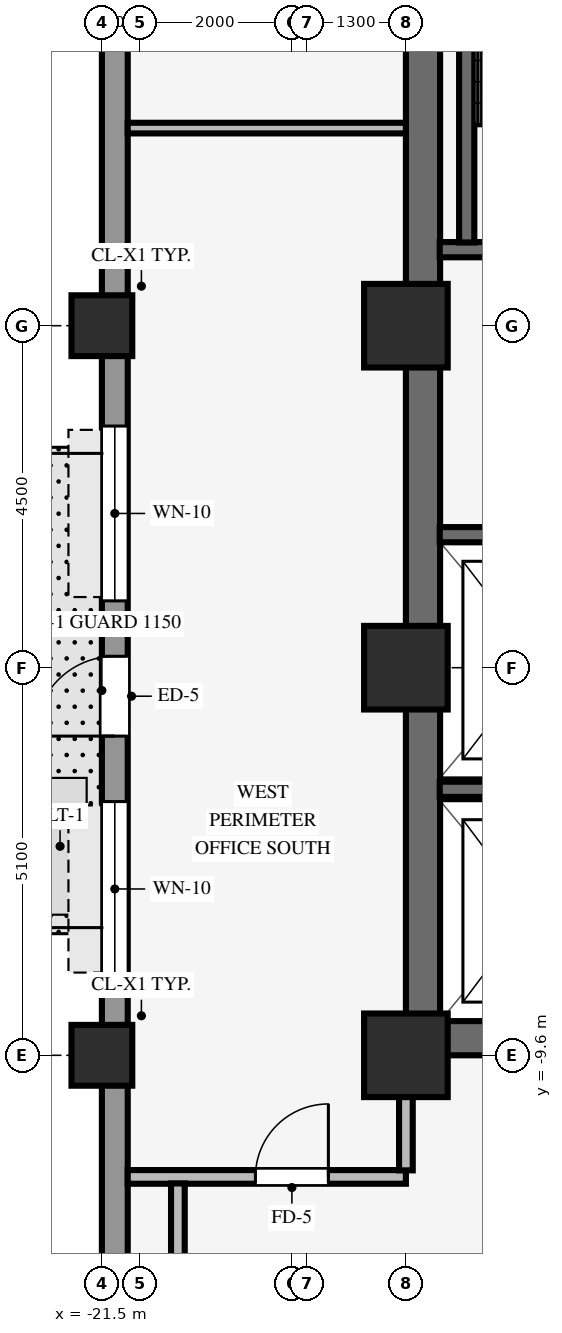
"""IFC4 building model, lengths in metres.
Left out: names, types, materials, properties, quantities, classifications, styles, units other than length and angle.
Written with IfcOpenShell. Run it as: python <this file> out.ifc"""

import sys

from ifc_helpers import new_model, si_unit, direction, frame, frame_2d, origin, origin_2d, place, context, subcontext, project, spatial, rectangle, hollow_rectangle, extrude, source, transform, mapped, element, fill, save


model = new_model("IFC4")
c1 = context("Model", 3, precision=1e-05, world=origin(), true_north=direction((0.0, 1.0)))
c2 = subcontext(c1, "Body", "Model", "MODEL_VIEW")
j1 = project(units=[si_unit("LENGTHUNIT", "METRE"), si_unit("PLANEANGLEUNIT", "RADIAN")], contexts=[c1])
p1 = place(None, origin())
s1 = spatial("IfcSite", under=j1, at=p1, CompositionType="ELEMENT")
p2 = place(p1, origin())
s2 = spatial("IfcBuilding", under=s1, at=p2, CompositionType="ELEMENT")
p3 = place(p2, frame((0.0, 0.0, 67.75)))
s3 = spatial("IfcBuildingStorey", under=s2, at=p3, CompositionType="ELEMENT", Elevation=67.75)
p4 = place(p3, frame((-17.5, -9.375, 0.0), z_axis=(0.0, 0.0, 1.0), x_axis=(1.0, 0.0, 0.0)))
e1 = element("IfcWall", 1, at=p4, inside=s3, PredefinedType="SHEAR", context=c2, shape_type="SweptSolid", body=[
    extrude(rectangle(XDim=8.5, YDim=0.45, at=frame_2d((4.25, 0.0))), origin(), (0.0, 0.0, 1.0), 3.37),
])
p5 = place(p3, frame((-17.275, -9.155, 0.0), z_axis=(0.0, 0.0, 1.0), x_axis=(0.0, 1.0, 0.0)))
e2 = element("IfcWall", 2, at=p5, inside=s3, PredefinedType="SHEAR", context=c2, shape_type="SweptSolid", body=[
    extrude(rectangle(XDim=18.31, YDim=0.45, at=frame_2d((9.155, 0.0))), origin(), (0.0, 0.0, 1.0), 3.37),
])
for number, where, z_axis, x_axis in (
    (3, (-17.5, -9.6, 0.0), (0.0, 0.0, 1.0), (1.0, 0.0, 0.0)),
    (4, (-17.5, -4.5, 0.0), (0.0, 0.0, 1.0), (1.0, 0.0, 0.0)),
    (5, (-17.5, 0.0, 0.0), (0.0, 0.0, 1.0), (1.0, 0.0, 0.0)),
):
    element("IfcColumn", number, at=place(p3, frame(where, z_axis=z_axis, x_axis=x_axis)), inside=s3, PredefinedType="COLUMN", context=c2, shape_type="SweptSolid", body=[
        extrude(rectangle(XDim=1.1, YDim=1.1, at=origin_2d()), origin(), (0.0, 0.0, 1.0), 3.37),
    ])
for number, where, z_axis, x_axis in (
    (6, (-21.5, -9.6, 0.0), (0.0, 0.0, 1.0), (1.0, 0.0, 0.0)),
    (7, (-21.5, 0.0, 0.0), (0.0, 0.0, 1.0), (1.0, 0.0, 0.0)),
):
    element("IfcColumn", number, at=place(p3, frame(where, z_axis=z_axis, x_axis=x_axis)), inside=s3, PredefinedType="COLUMN", context=c2, shape_type="SweptSolid", body=[
        extrude(hollow_rectangle(XDim=0.8, YDim=0.8, WallThickness=0.055, InnerFilletRadius=0.055, OuterFilletRadius=0.11, at=origin_2d()), origin(), (0.0, 0.0, 1.0), 3.37),
    ])
p6 = place(p3, frame((-21.33, -20.764, 0.0), z_axis=(0.0, 0.0, 1.0), x_axis=(0.0, 1.0, 0.0)))
e8 = element("IfcWall", 8, at=p6, inside=s3, PredefinedType="STANDARD", context=c2, shape_type="SweptSolid", body=[
    extrude(rectangle(XDim=41.528, YDim=0.34, at=frame_2d((20.764, 0.0))), origin(), (0.0, 0.0, 1.0), 2.705),
])
p7 = place(p6, frame((15.364, 0.0, 0.0)))
e9 = element("IfcOpeningElement", 9, at=p7, cuts=e8, PredefinedType="OPENING", context=c2, shape_type="SweptSolid", body=[
    extrude(rectangle(XDim=1.05, YDim=2.1, at=frame_2d((0.525, 1.05))), frame((0.0, 0.18, 0.0), z_axis=(0.0, -1.0, 0.0), x_axis=(1.0, 0.0, 0.0)), (0.0, 0.0, 1.0), 0.36),
])
p8 = place(p6, frame((12.202, 0.0, 0.8)))
e10 = element("IfcOpeningElement", 10, at=p8, cuts=e8, PredefinedType="OPENING", context=c2, shape_type="SweptSolid", body=[
    extrude(rectangle(XDim=2.3, YDim=1.62, at=frame_2d((1.15, 0.81))), frame((0.0, 0.18, 0.0), z_axis=(0.0, -1.0, 0.0), x_axis=(1.0, 0.0, 0.0)), (0.0, 0.0, 1.0), 0.36),
])
p9 = place(p6, frame((17.144, 0.0, 0.8)))
e11 = element("IfcOpeningElement", 11, at=p9, cuts=e8, PredefinedType="OPENING", context=c2, shape_type="SweptSolid", body=[
    extrude(rectangle(XDim=2.3, YDim=1.62, at=frame_2d((1.15, 0.81))), frame((0.0, 0.18, 0.0), z_axis=(0.0, -1.0, 0.0), x_axis=(1.0, 0.0, 0.0)), (0.0, 0.0, 1.0), 0.36),
])
p10 = place(p6, frame((27.025, 0.0, 0.8)))
e12 = element("IfcOpeningElement", 12, at=p10, cuts=e8, PredefinedType="OPENING", context=c2, shape_type="SweptSolid", body=[
    extrude(rectangle(XDim=2.3, YDim=1.62, at=frame_2d((1.15, 0.81))), frame((0.0, 0.18, 0.0), z_axis=(0.0, -1.0, 0.0), x_axis=(1.0, 0.0, 0.0)), (0.0, 0.0, 1.0), 0.36),
])
p11 = place(p3, frame((-17.055, 1.0, 0.0), z_axis=(0.0, 0.0, 1.0), x_axis=(1.0, 0.0, 0.0)))
e13 = element("IfcWall", 13, at=p11, inside=s3, PredefinedType="SHEAR", context=c2, shape_type="SweptSolid", body=[
    extrude(rectangle(XDim=3.52, YDim=0.2, at=frame_2d((1.76, 0.0))), origin(), (0.0, 0.0, 1.0), 3.37),
])
p12 = place(p3, frame((-16.7, 1.095, 0.0), z_axis=(0.0, 0.0, 1.0), x_axis=(0.0, 1.0, 0.0)))
e14 = element("IfcWall", 14, at=p12, inside=s3, PredefinedType="SHEAR", context=c2, shape_type="SweptSolid", body=[
    extrude(rectangle(XDim=8.06, YDim=0.2, at=frame_2d((4.03, 0.0))), origin(), (0.0, 0.0, 1.0), 3.37),
])
p13 = place(p3, frame((-17.055, -6.1, 0.0), z_axis=(0.0, 0.0, 1.0), x_axis=(1.0, 0.0, 0.0)))
e15 = element("IfcWall", 15, at=p13, inside=s3, PredefinedType="SHEAR", context=c2, shape_type="SweptSolid", body=[
    extrude(rectangle(XDim=2.805, YDim=0.2, at=frame_2d((1.402, 0.0))), origin(), (0.0, 0.0, 1.0), 3.37),
])
p14 = place(p3, frame((-17.055, -2.75, 0.0), z_axis=(0.0, 0.0, 1.0), x_axis=(1.0, 0.0, 0.0)))
e16 = element("IfcWall", 16, at=p14, inside=s3, PredefinedType="SHEAR", context=c2, shape_type="SweptSolid", body=[
    extrude(rectangle(XDim=2.61, YDim=0.2, at=frame_2d((1.305, 0.0))), origin(), (0.0, 0.0, 1.0), 3.37),
])
p15 = place(p3, frame((-21.16, -11.2, 0.0), z_axis=(0.0, 0.0, 1.0), x_axis=(1.0, 0.0, 0.0)))
e17 = element("IfcWall", 17, at=p15, inside=s3, PredefinedType="PARTITIONING", context=c2, shape_type="SweptSolid", body=[
    extrude(rectangle(XDim=3.66, YDim=0.18, at=frame_2d((1.83, 0.0))), origin(), (0.0, 0.0, 1.0), 3.36),
])
p16 = place(p15, frame((1.68, 0.0, 0.0)))
e18 = element("IfcOpeningElement", 18, at=p16, cuts=e17, PredefinedType="OPENING", context=c2, shape_type="SweptSolid", body=[
    extrude(rectangle(XDim=0.96, YDim=2.1, at=frame_2d((0.48, 1.05))), frame((0.0, 0.1, 0.0), z_axis=(0.0, -1.0, 0.0), x_axis=(1.0, 0.0, 0.0)), (0.0, 0.0, 1.0), 0.2),
])
p17 = place(p3, frame((-21.16, 2.6, 0.0), z_axis=(0.0, 0.0, 1.0), x_axis=(1.0, 0.0, 0.0)))
e19 = element("IfcWall", 19, at=p17, inside=s3, PredefinedType="PARTITIONING", context=c2, shape_type="SweptSolid", body=[
    extrude(rectangle(XDim=3.66, YDim=0.14, at=frame_2d((1.83, 0.0))), origin(), (0.0, 0.0, 1.0), 3.36),
])
p18 = place(p3, frame((-20.5, -13.514, 0.0), z_axis=(0.0, 0.0, 1.0), x_axis=(0.0, 1.0, 0.0)))
e20 = element("IfcWall", 20, at=p18, inside=s3, PredefinedType="PARTITIONING", context=c2, shape_type="SweptSolid", body=[
    extrude(rectangle(XDim=2.228, YDim=0.18, at=frame_2d((1.114, 0.0))), origin(), (0.0, 0.0, 1.0), 3.36),
])
p19 = place(p3, frame((-17.5, -11.114, 0.0), z_axis=(0.0, 0.0, 1.0), x_axis=(0.0, 1.0, 0.0)))
e21 = element("IfcWall", 21, at=p19, inside=s3, PredefinedType="PARTITIONING", context=c2, shape_type="SweptSolid", body=[
    extrude(rectangle(XDim=0.968, YDim=0.18, at=frame_2d((0.484, 0.0))), origin(), (0.0, 0.0, 1.0), 2.738),
])
m1 = source(origin(), c2, "Body", "SweptSolid", [
    extrude(rectangle(XDim=1.05, YDim=2.1, at=frame_2d((0.525, 1.05))), frame((0.0, 0.025, 0.0), z_axis=(0.0, -1.0, 0.0), x_axis=(1.0, 0.0, 0.0)), (0.0, 0.0, 1.0), 0.05),
])
p20 = place(p7, origin())
e22 = element("IfcDoor", 22, at=p20, inside=s3, OperationType="SINGLE_SWING_LEFT", PredefinedType="DOOR", context=c2, shape_type="MappedRepresentation", body=[
    mapped(m1, transform((0.0, 0.0, 0.0), scale=1.0)),
])
fill(e9, e22)
m2 = source(origin(), c2, "Body", "SweptSolid", [
    extrude(rectangle(XDim=2.3, YDim=1.62, at=frame_2d((1.15, 0.81))), frame((0.0, 0.03, 0.0), z_axis=(0.0, -1.0, 0.0), x_axis=(1.0, 0.0, 0.0)), (0.0, 0.0, 1.0), 0.06),
])
p21 = place(p8, origin())
e23 = element("IfcWindow", 23, at=p21, inside=s3, PartitioningType="SINGLE_PANEL", PredefinedType="WINDOW", context=c2, shape_type="MappedRepresentation", body=[
    mapped(m2, transform((0.0, 0.0, 0.0), scale=1.0)),
])
fill(e10, e23)
p22 = place(p9, origin())
e24 = element("IfcWindow", 24, at=p22, inside=s3, PartitioningType="SINGLE_PANEL", PredefinedType="WINDOW", context=c2, shape_type="MappedRepresentation", body=[
    mapped(m2, transform((0.0, 0.0, 0.0), scale=1.0)),
])
fill(e11, e24)
m3 = source(origin(), c2, "Body", "SweptSolid", [
    extrude(rectangle(XDim=0.96, YDim=2.1, at=frame_2d((0.48, 1.05))), frame((0.0, 0.025, 0.0), z_axis=(0.0, -1.0, 0.0), x_axis=(1.0, 0.0, 0.0)), (0.0, 0.0, 1.0), 0.05),
])
p23 = place(p16, origin())
e25 = element("IfcDoor", 25, at=p23, inside=s3, OperationType="SINGLE_SWING_RIGHT", PredefinedType="DOOR", context=c2, shape_type="MappedRepresentation", body=[
    mapped(m3, transform((0.0, 0.0, 0.0), scale=1.0)),
])
fill(e18, e25)
save(model, sys.argv[1])
